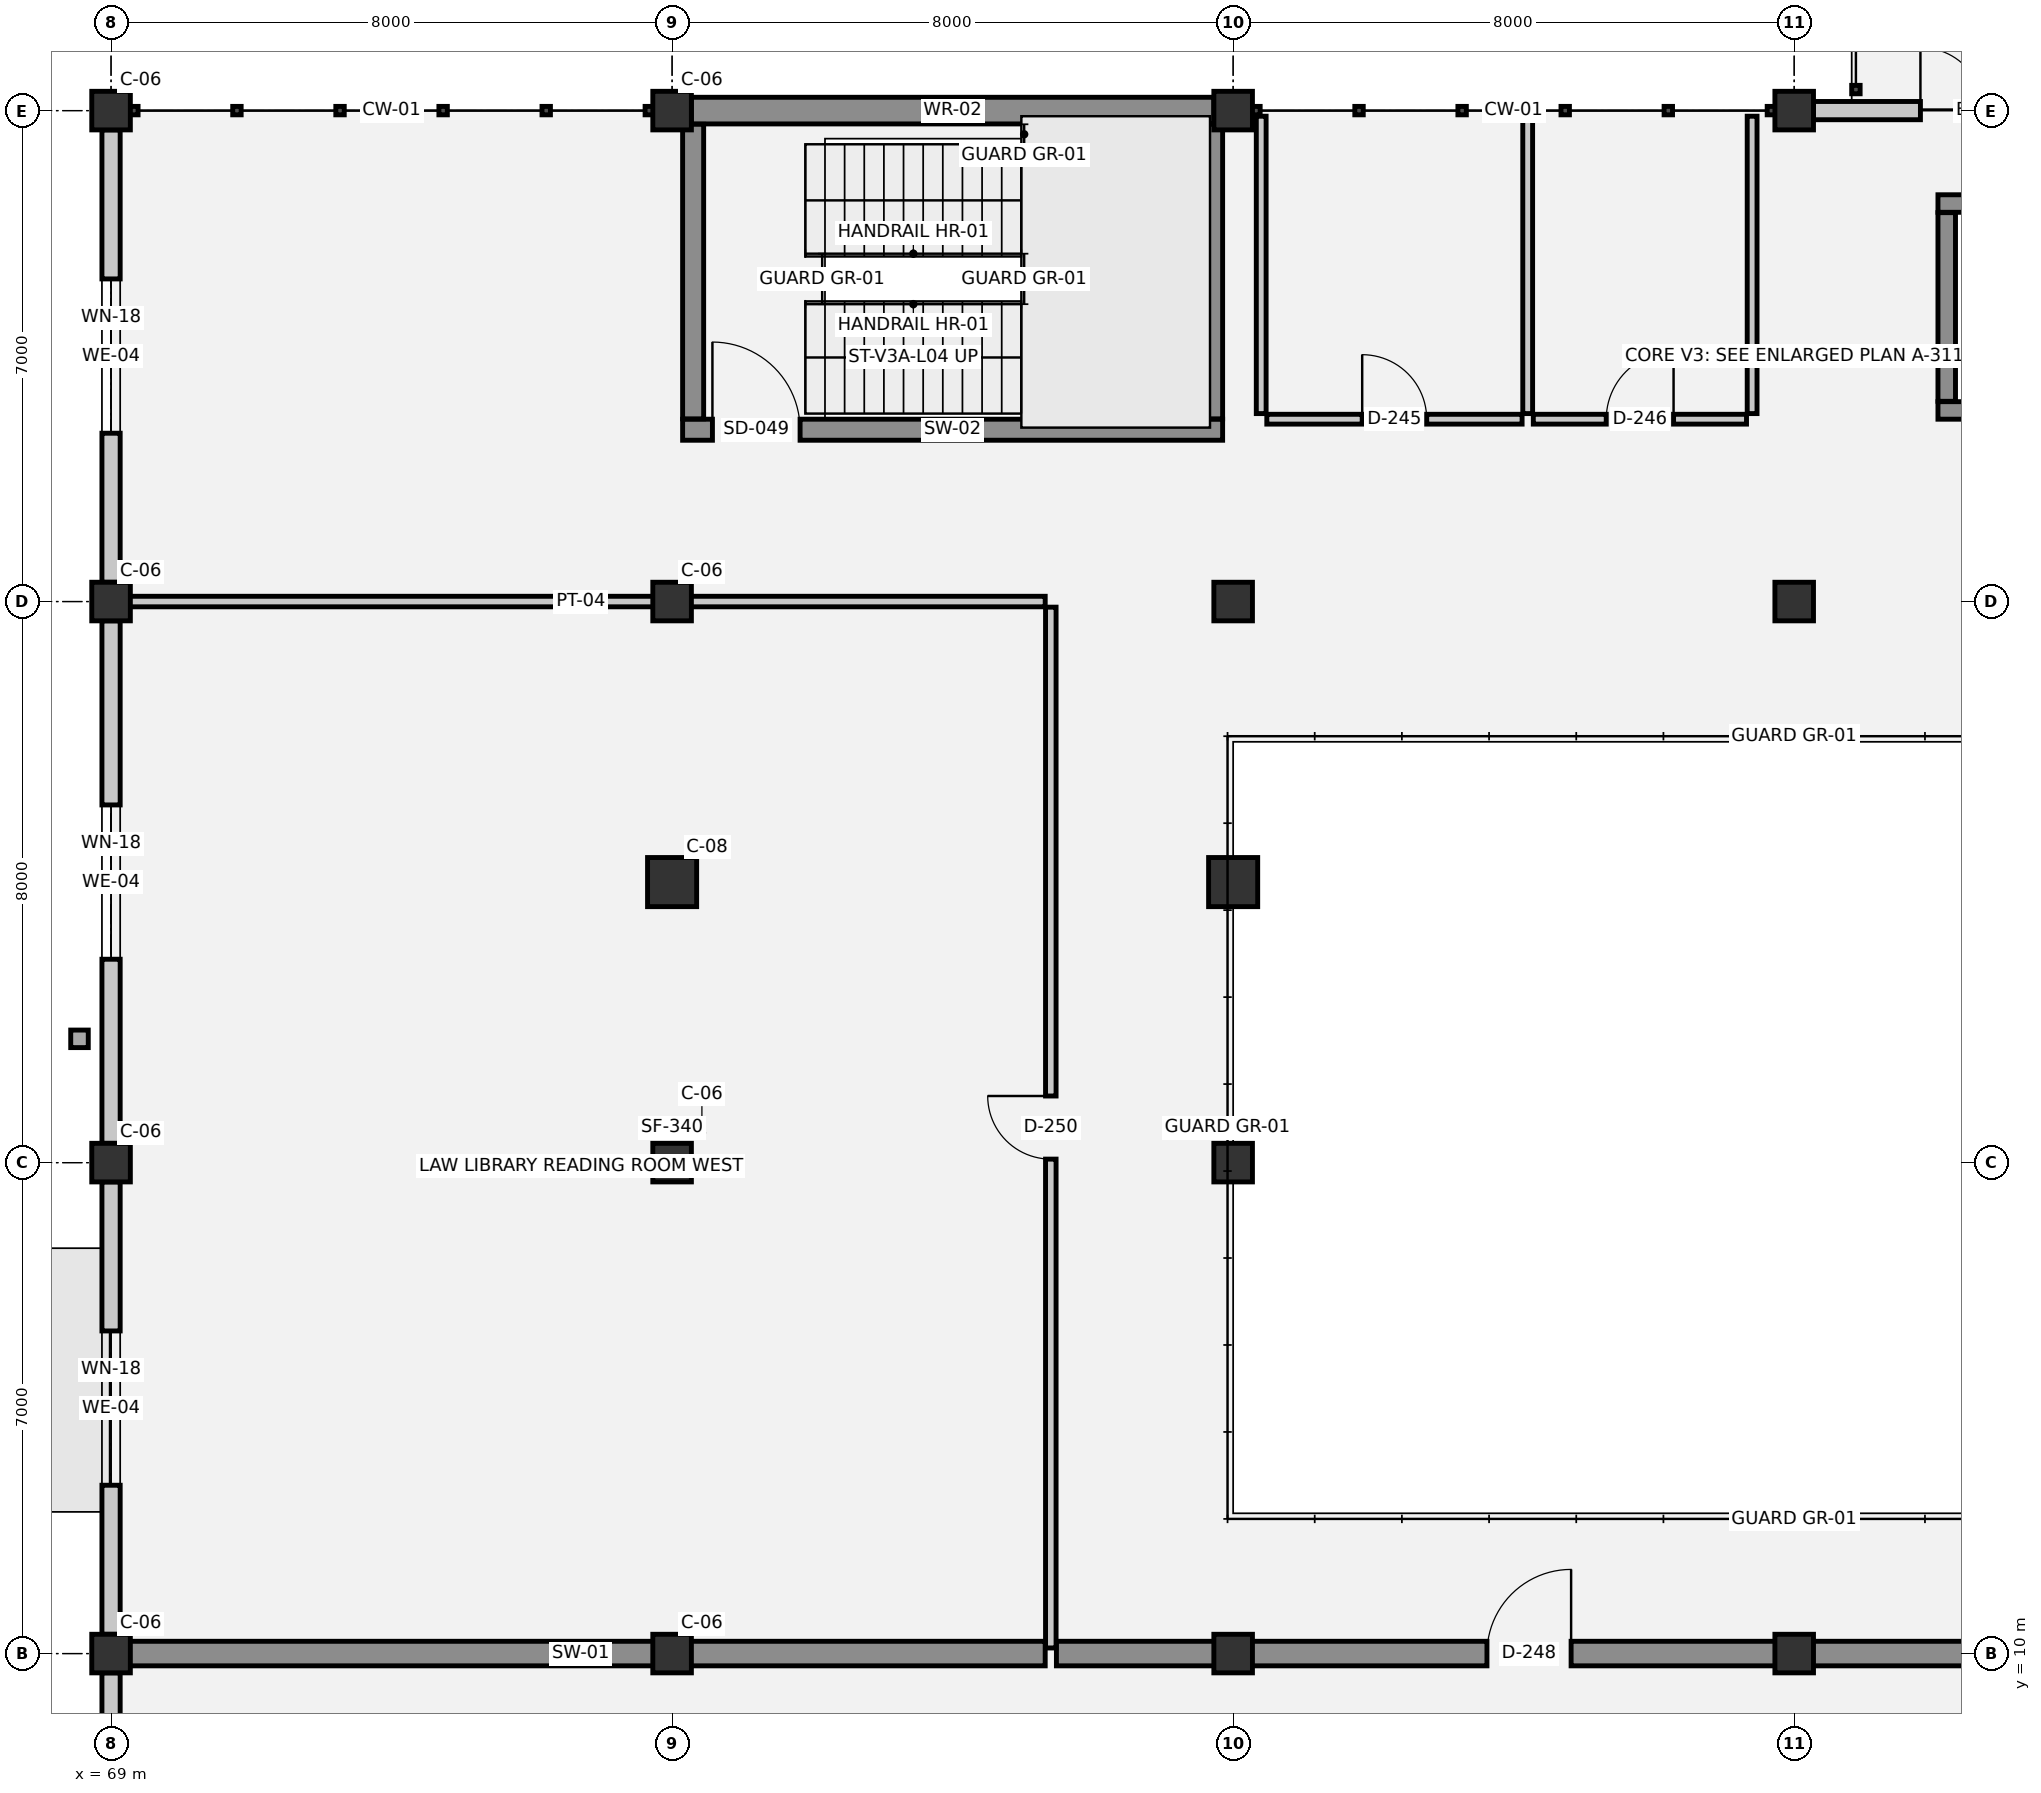
"""IFC4 building model, lengths in metres.
Left out: names, types, materials, properties, quantities, classifications, styles, units other than length and angle.
Written with IfcOpenShell. Run it as: python <this file> out.ifc"""

import sys

from ifc_helpers import new_model, si_unit, direction, frame, frame_2d, origin, origin_2d, place, context, subcontext, project, spatial, rectangle, circle, extrude, element, fill, save


model = new_model("IFC4")
c1 = context("Model", 3, precision=1e-05, world=origin(), true_north=direction((0.0, 1.0)))
c2 = subcontext(c1, "Body", "Model", "MODEL_VIEW")
j1 = project(units=[si_unit("LENGTHUNIT", "METRE"), si_unit("PLANEANGLEUNIT", "RADIAN")], contexts=[c1])
p1 = place(None, origin())
s1 = spatial("IfcSite", under=j1, at=p1, CompositionType="ELEMENT")
p2 = place(p1, origin())
s2 = spatial("IfcBuilding", under=s1, at=p2, CompositionType="ELEMENT")
p3 = place(p2, frame((0.0, 0.0, 14.4)))
s3 = spatial("IfcBuildingStorey", under=s2, at=p3, CompositionType="ELEMENT", Elevation=14.4)
for number, where, z_axis, x_axis in (
    (1, (69.0, 10.0, 0.0), (0.0, 0.0, 1.0), (1.0, 0.0, 0.0)),
    (2, (69.0, 17.0, 0.0), (0.0, 0.0, 1.0), (1.0, 0.0, 0.0)),
    (3, (69.0, 25.0, 0.0), (0.0, 0.0, 1.0), (1.0, 0.0, 0.0)),
    (4, (69.0, 32.0, 0.0), (0.0, 0.0, 1.0), (1.0, 0.0, 0.0)),
    (5, (77.0, 10.0, 0.0), (0.0, 0.0, 1.0), (1.0, 0.0, 0.0)),
    (6, (77.0, 17.0, 0.0), (0.0, 0.0, 1.0), (1.0, 0.0, 0.0)),
    (7, (77.0, 25.0, 0.0), (0.0, 0.0, 1.0), (1.0, 0.0, 0.0)),
    (8, (77.0, 32.0, 0.0), (0.0, 0.0, 1.0), (1.0, 0.0, 0.0)),
    (9, (85.0, 10.0, 0.0), (0.0, 0.0, 1.0), (1.0, 0.0, 0.0)),
    (10, (85.0, 17.0, 0.0), (0.0, 0.0, 1.0), (1.0, 0.0, 0.0)),
    (11, (85.0, 25.0, 0.0), (0.0, 0.0, 1.0), (1.0, 0.0, 0.0)),
    (12, (85.0, 32.0, 0.0), (0.0, 0.0, 1.0), (1.0, 0.0, 0.0)),
    (13, (93.0, 10.0, 0.0), (0.0, 0.0, 1.0), (1.0, 0.0, 0.0)),
    (14, (93.0, 25.0, 0.0), (0.0, 0.0, 1.0), (1.0, 0.0, 0.0)),
    (15, (93.0, 32.0, 0.0), (0.0, 0.0, 1.0), (1.0, 0.0, 0.0)),
):
    element("IfcColumn", number, at=place(p3, frame(where, z_axis=z_axis, x_axis=x_axis)), inside=s3, PredefinedType="COLUMN", context=c2, shape_type="SweptSolid", body=[
        extrude(rectangle(XDim=0.55, YDim=0.55, at=origin_2d()), origin(), (0.0, 0.0, 1.0), 3.9),
    ])
for number, where, z_axis, x_axis in (
    (16, (77.0, 21.0, 0.0), (0.0, 0.0, 1.0), (1.0, 0.0, 0.0)),
    (17, (85.0, 21.0, 0.0), (0.0, 0.0, 1.0), (1.0, 0.0, 0.0)),
):
    element("IfcColumn", number, at=place(p3, frame(where, z_axis=z_axis, x_axis=x_axis)), inside=s3, PredefinedType="COLUMN", context=c2, shape_type="SweptSolid", body=[
        extrude(circle(Radius=0.35, at=origin_2d()), origin(), (0.0, 0.0, 1.0), 3.9),
    ])
p4 = place(p3, frame((69.0, 4.275, 0.0), z_axis=(0.0, 0.0, 1.0), x_axis=(0.0, 1.0, 0.0)))
e18 = element("IfcWall", 18, at=p4, inside=s3, PredefinedType="SOLIDWALL", context=c2, shape_type="SweptSolid", body=[
    extrude(rectangle(XDim=5.45, YDim=0.26, at=frame_2d((2.725, 0.0))), origin(), (0.0, 0.0, 1.0), 2.84),
])
p5 = place(p4, frame((2.175, 0.0, 0.9)))
e19 = element("IfcOpeningElement", 19, at=p5, cuts=e18, PredefinedType="OPENING", context=c2, shape_type="SweptSolid", body=[
    extrude(rectangle(XDim=1.1, YDim=1.2, at=frame_2d((0.55, 0.6))), frame((0.0, 0.14, 0.0), z_axis=(0.0, -1.0, 0.0), x_axis=(1.0, 0.0, 0.0)), (0.0, 0.0, 1.0), 0.28),
])
p6 = place(p3, frame((69.0, 10.275, 0.0), z_axis=(0.0, 0.0, 1.0), x_axis=(0.0, 1.0, 0.0)))
e20 = element("IfcWall", 20, at=p6, inside=s3, PredefinedType="SOLIDWALL", context=c2, shape_type="SweptSolid", body=[
    extrude(rectangle(XDim=6.45, YDim=0.26, at=frame_2d((3.225, 0.0))), origin(), (0.0, 0.0, 1.0), 2.84),
])
p7 = place(p6, frame((2.125, 0.0, 0.9)))
e21 = element("IfcOpeningElement", 21, at=p7, cuts=e20, PredefinedType="OPENING", context=c2, shape_type="SweptSolid", body=[
    extrude(rectangle(XDim=2.2, YDim=1.0, at=frame_2d((1.1, 0.5))), frame((0.0, 0.14, 0.0), z_axis=(0.0, -1.0, 0.0), x_axis=(1.0, 0.0, 0.0)), (0.0, 0.0, 1.0), 0.28),
])
p8 = place(p3, frame((69.0, 17.275, 0.0), z_axis=(0.0, 0.0, 1.0), x_axis=(0.0, 1.0, 0.0)))
e22 = element("IfcWall", 22, at=p8, inside=s3, PredefinedType="SOLIDWALL", context=c2, shape_type="SweptSolid", body=[
    extrude(rectangle(XDim=7.45, YDim=0.26, at=frame_2d((3.725, 0.0))), origin(), (0.0, 0.0, 1.0), 2.84),
])
p9 = place(p8, frame((2.625, 0.0, 0.9)))
e23 = element("IfcOpeningElement", 23, at=p9, cuts=e22, PredefinedType="OPENING", context=c2, shape_type="SweptSolid", body=[
    extrude(rectangle(XDim=2.2, YDim=1.0, at=frame_2d((1.1, 0.5))), frame((0.0, 0.14, 0.0), z_axis=(0.0, -1.0, 0.0), x_axis=(1.0, 0.0, 0.0)), (0.0, 0.0, 1.0), 0.28),
])
p10 = place(p3, frame((69.0, 25.275, 0.0), z_axis=(0.0, 0.0, 1.0), x_axis=(0.0, 1.0, 0.0)))
e24 = element("IfcWall", 24, at=p10, inside=s3, PredefinedType="SOLIDWALL", context=c2, shape_type="SweptSolid", body=[
    extrude(rectangle(XDim=6.45, YDim=0.26, at=frame_2d((3.225, 0.0))), origin(), (0.0, 0.0, 1.0), 2.84),
])
p11 = place(p10, frame((2.125, 0.0, 0.9)))
e25 = element("IfcOpeningElement", 25, at=p11, cuts=e24, PredefinedType="OPENING", context=c2, shape_type="SweptSolid", body=[
    extrude(rectangle(XDim=2.2, YDim=1.0, at=frame_2d((1.1, 0.5))), frame((0.0, 0.14, 0.0), z_axis=(0.0, -1.0, 0.0), x_axis=(1.0, 0.0, 0.0)), (0.0, 0.0, 1.0), 0.28),
])
p12 = place(p3, frame((77.275, 32.0, 0.0), z_axis=(0.0, 0.0, 1.0), x_axis=(1.0, 0.0, 0.0)))
e26 = element("IfcWall", 26, at=p12, inside=s3, PredefinedType="STANDARD", context=c2, shape_type="SweptSolid", body=[
    extrude(rectangle(XDim=7.45, YDim=0.38, at=frame_2d((3.725, 0.0))), origin(), (0.0, 0.0, 1.0), 2.84),
])
p13 = place(p3, frame((93.275, 32.0, 0.0), z_axis=(0.0, 0.0, 1.0), x_axis=(1.0, 0.0, 0.0)))
e27 = element("IfcWall", 27, at=p13, inside=s3, PredefinedType="SOLIDWALL", context=c2, shape_type="SweptSolid", body=[
    extrude(rectangle(XDim=7.45, YDim=0.26, at=frame_2d((3.725, 0.0))), origin(), (0.0, 0.0, 1.0), 2.84),
])
p14 = place(p13, frame((1.525, 0.0, 0.0)))
e28 = element("IfcOpeningElement", 28, at=p14, cuts=e27, PredefinedType="OPENING", context=c2, shape_type="SweptSolid", body=[
    extrude(rectangle(XDim=1.8, YDim=2.25, at=frame_2d((0.9, 1.125))), frame((0.0, 0.14, 0.0), z_axis=(0.0, -1.0, 0.0), x_axis=(1.0, 0.0, 0.0)), (0.0, 0.0, 1.0), 0.28),
])
p15 = place(p3, frame((95.05, 27.725, 0.0), z_axis=(0.0, 0.0, 1.0), x_axis=(1.0, 0.0, 0.0)))
e29 = element("IfcWall", 29, at=p15, inside=s3, PredefinedType="SHEAR", context=c2, shape_type="SweptSolid", body=[
    extrude(rectangle(XDim=2.9, YDim=0.25, at=frame_2d((1.45, 0.0))), origin(), (0.0, 0.0, 1.0), 3.9),
])
p16 = place(p15, frame((0.9, 0.0, 0.0)))
e30 = element("IfcOpeningElement", 30, at=p16, cuts=e29, PredefinedType="OPENING", context=c2, shape_type="SweptSolid", body=[
    extrude(rectangle(XDim=1.1, YDim=2.15, at=frame_2d((0.55, 1.075))), frame((0.0, 0.135, 0.0), z_axis=(0.0, -1.0, 0.0), x_axis=(1.0, 0.0, 0.0)), (0.0, 0.0, 1.0), 0.27),
])
p17 = place(p3, frame((97.95, 30.675, 0.0), z_axis=(0.0, 0.0, 1.0), x_axis=(-1.0, 0.0, 0.0)))
e31 = element("IfcWall", 31, at=p17, inside=s3, PredefinedType="SHEAR", context=c2, shape_type="SweptSolid", body=[
    extrude(rectangle(XDim=2.9, YDim=0.25, at=frame_2d((1.45, 0.0))), origin(), (0.0, 0.0, 1.0), 3.9),
])
p18 = place(p3, frame((95.175, 30.545, 0.0), z_axis=(0.0, 0.0, 1.0), x_axis=(0.0, -1.0, 0.0)))
e32 = element("IfcWall", 32, at=p18, inside=s3, PredefinedType="SHEAR", context=c2, shape_type="SweptSolid", body=[
    extrude(rectangle(XDim=2.69, YDim=0.25, at=frame_2d((1.345, 0.0))), origin(), (0.0, 0.0, 1.0), 3.9),
])
p19 = place(p3, frame((77.15, 27.45, 0.0), z_axis=(0.0, 0.0, 1.0), x_axis=(1.0, 0.0, 0.0)))
e33 = element("IfcWall", 33, at=p19, inside=s3, PredefinedType="SHEAR", context=c2, shape_type="SweptSolid", body=[
    extrude(rectangle(XDim=7.7, YDim=0.3, at=frame_2d((3.85, 0.0))), origin(), (0.0, 0.0, 1.0), 3.56),
])
p20 = place(p19, frame((0.425, 0.0, 0.0)))
e34 = element("IfcOpeningElement", 34, at=p20, cuts=e33, PredefinedType="OPENING", context=c2, shape_type="SweptSolid", body=[
    extrude(rectangle(XDim=1.25, YDim=2.15, at=frame_2d((0.625, 1.075))), frame((0.0, 0.16, 0.0), z_axis=(0.0, -1.0, 0.0), x_axis=(1.0, 0.0, 0.0)), (0.0, 0.0, 1.0), 0.32),
])
for number, where, z_axis, x_axis in (
    (35, (77.3, 31.805, 0.0), (0.0, 0.0, 1.0), (0.0, -1.0, 0.0)),
    (36, (84.7, 27.605, 0.0), (0.0, 0.0, 1.0), (0.0, 1.0, 0.0)),
):
    element("IfcWall", number, at=place(p3, frame(where, z_axis=z_axis, x_axis=x_axis)), inside=s3, PredefinedType="SHEAR", context=c2, shape_type="SweptSolid", body=[
        extrude(rectangle(XDim=4.2, YDim=0.3, at=frame_2d((2.1, 0.0))), origin(), (0.0, 0.0, 1.0), 3.56),
    ])
p21 = place(p3, frame((69.08, 10.0, 0.0), z_axis=(0.0, 0.0, 1.0), x_axis=(1.0, 0.0, 0.0)))
e37 = element("IfcWall", 37, at=p21, inside=s3, PredefinedType="SHEAR", context=c2, shape_type="SweptSolid", body=[
    extrude(rectangle(XDim=13.24, YDim=0.35, at=frame_2d((6.62, 0.0))), origin(), (0.0, 0.0, 1.0), 3.54),
])
p22 = place(p3, frame((82.48, 10.0, 0.0), z_axis=(0.0, 0.0, 1.0), x_axis=(1.0, 0.0, 0.0)))
e38 = element("IfcWall", 38, at=p22, inside=s3, PredefinedType="SHEAR", context=c2, shape_type="SweptSolid", body=[
    extrude(rectangle(XDim=18.44, YDim=0.35, at=frame_2d((9.22, 0.0))), origin(), (0.0, 0.0, 1.0), 3.54),
])
p23 = place(p22, frame((6.139, 0.0, 0.0)))
e39 = element("IfcOpeningElement", 39, at=p23, cuts=e38, PredefinedType="OPENING", context=c2, shape_type="SweptSolid", body=[
    extrude(rectangle(XDim=1.2, YDim=2.15, at=frame_2d((0.6, 1.075))), frame((0.0, 0.185, 0.0), z_axis=(0.0, -1.0, 0.0), x_axis=(1.0, 0.0, 0.0)), (0.0, 0.0, 1.0), 0.37),
])
p24 = place(p3, frame((69.08, 25.0, 0.0), z_axis=(0.0, 0.0, 1.0), x_axis=(1.0, 0.0, 0.0)))
e40 = element("IfcWall", 40, at=p24, inside=s3, PredefinedType="PARTITIONING", context=c2, shape_type="SweptSolid", body=[
    extrude(rectangle(XDim=13.24, YDim=0.15, at=frame_2d((6.62, 0.0))), origin(), (0.0, 0.0, 1.0), 2.96),
])
p25 = place(p3, frame((85.48, 27.6, 0.0), z_axis=(0.0, 0.0, 1.0), x_axis=(1.0, 0.0, 0.0)))
e41 = element("IfcWall", 41, at=p25, inside=s3, PredefinedType="PLUMBINGWALL", context=c2, shape_type="SweptSolid", body=[
    extrude(rectangle(XDim=3.64, YDim=0.14, at=frame_2d((1.82, 0.0))), origin(), (0.0, 0.0, 1.0), 3.54),
])
p26 = place(p25, frame((1.36, 0.0, 0.0)))
e42 = element("IfcOpeningElement", 42, at=p26, cuts=e41, PredefinedType="OPENING", context=c2, shape_type="SweptSolid", body=[
    extrude(rectangle(XDim=0.92, YDim=2.1, at=frame_2d((0.46, 1.05))), frame((0.0, 0.08, 0.0), z_axis=(0.0, -1.0, 0.0), x_axis=(1.0, 0.0, 0.0)), (0.0, 0.0, 1.0), 0.16),
])
p27 = place(p3, frame((89.28, 27.6, 0.0), z_axis=(0.0, 0.0, 1.0), x_axis=(1.0, 0.0, 0.0)))
e43 = element("IfcWall", 43, at=p27, inside=s3, PredefinedType="PLUMBINGWALL", context=c2, shape_type="SweptSolid", body=[
    extrude(rectangle(XDim=3.04, YDim=0.14, at=frame_2d((1.52, 0.0))), origin(), (0.0, 0.0, 1.0), 3.54),
])
p28 = place(p27, frame((1.04, 0.0, 0.0)))
e44 = element("IfcOpeningElement", 44, at=p28, cuts=e43, PredefinedType="OPENING", context=c2, shape_type="SweptSolid", body=[
    extrude(rectangle(XDim=0.96, YDim=2.1, at=frame_2d((0.48, 1.05))), frame((0.0, 0.08, 0.0), z_axis=(0.0, -1.0, 0.0), x_axis=(1.0, 0.0, 0.0)), (0.0, 0.0, 1.0), 0.16),
])
p29 = place(p3, frame((82.4, 10.08, 0.0), z_axis=(0.0, 0.0, 1.0), x_axis=(0.0, 1.0, 0.0)))
e45 = element("IfcWall", 45, at=p29, inside=s3, PredefinedType="PARTITIONING", context=c2, shape_type="SweptSolid", body=[
    extrude(rectangle(XDim=14.84, YDim=0.15, at=frame_2d((7.42, 0.0))), origin(), (0.0, 0.0, 1.0), 3.54),
])
p30 = place(p29, frame((6.97, 0.0, 0.0)))
e46 = element("IfcOpeningElement", 46, at=p30, cuts=e45, PredefinedType="OPENING", context=c2, shape_type="SweptSolid", body=[
    extrude(rectangle(XDim=0.9, YDim=2.15, at=frame_2d((0.45, 1.075))), frame((0.0, 0.085, 0.0), z_axis=(0.0, -1.0, 0.0), x_axis=(1.0, 0.0, 0.0)), (0.0, 0.0, 1.0), 0.17),
])
for number, where, z_axis, x_axis in (
    (47, (85.4, 27.68, 0.0), (0.0, 0.0, 1.0), (0.0, 1.0, 0.0)),
    (48, (89.2, 27.68, 0.0), (0.0, 0.0, 1.0), (0.0, 1.0, 0.0)),
    (49, (92.4, 27.68, 0.0), (0.0, 0.0, 1.0), (0.0, 1.0, 0.0)),
):
    element("IfcWall", number, at=place(p3, frame(where, z_axis=z_axis, x_axis=x_axis)), inside=s3, PredefinedType="PLUMBINGWALL", context=c2, shape_type="SweptSolid", body=[
        extrude(rectangle(XDim=4.24, YDim=0.14, at=frame_2d((2.12, 0.0))), origin(), (0.0, 0.0, 1.0), 3.54),
    ])
p31 = place(p7, origin())
e50 = element("IfcWindow", 50, at=p31, inside=s3, PartitioningType="SINGLE_PANEL", PredefinedType="WINDOW", context=c2, shape_type="SweptSolid", body=[
    extrude(rectangle(XDim=2.2, YDim=1.0, at=frame_2d((1.1, 0.5))), frame((0.0, 0.03, 0.0), z_axis=(0.0, -1.0, 0.0), x_axis=(1.0, 0.0, 0.0)), (0.0, 0.0, 1.0), 0.06),
])
fill(e21, e50)
p32 = place(p9, origin())
e51 = element("IfcWindow", 51, at=p32, inside=s3, PartitioningType="SINGLE_PANEL", PredefinedType="WINDOW", context=c2, shape_type="SweptSolid", body=[
    extrude(rectangle(XDim=2.2, YDim=1.0, at=frame_2d((1.1, 0.5))), frame((0.0, 0.03, 0.0), z_axis=(0.0, -1.0, 0.0), x_axis=(1.0, 0.0, 0.0)), (0.0, 0.0, 1.0), 0.06),
])
fill(e23, e51)
p33 = place(p11, origin())
e52 = element("IfcWindow", 52, at=p33, inside=s3, PartitioningType="SINGLE_PANEL", PredefinedType="WINDOW", context=c2, shape_type="SweptSolid", body=[
    extrude(rectangle(XDim=2.2, YDim=1.0, at=frame_2d((1.1, 0.5))), frame((0.0, 0.03, 0.0), z_axis=(0.0, -1.0, 0.0), x_axis=(1.0, 0.0, 0.0)), (0.0, 0.0, 1.0), 0.06),
])
fill(e25, e52)
p34 = place(p14, origin())
e53 = element("IfcDoor", 53, at=p34, inside=s3, OperationType="DOUBLE_DOOR_SINGLE_SWING", PredefinedType="DOOR", context=c2, shape_type="SweptSolid", body=[
    extrude(rectangle(XDim=1.8, YDim=2.25, at=frame_2d((0.9, 1.125))), frame((0.0, 0.025, 0.0), z_axis=(0.0, -1.0, 0.0), x_axis=(1.0, 0.0, 0.0)), (0.0, 0.0, 1.0), 0.05),
])
fill(e28, e53)
p35 = place(p20, origin())
e54 = element("IfcDoor", 54, at=p35, inside=s3, OperationType="SINGLE_SWING_LEFT", PredefinedType="DOOR", context=c2, shape_type="SweptSolid", body=[
    extrude(rectangle(XDim=1.25, YDim=2.15, at=frame_2d((0.625, 1.075))), frame((0.0, 0.025, 0.0), z_axis=(0.0, -1.0, 0.0), x_axis=(1.0, 0.0, 0.0)), (0.0, 0.0, 1.0), 0.05),
])
fill(e34, e54)
p36 = place(p26, origin())
e55 = element("IfcDoor", 55, at=p36, inside=s3, OperationType="SINGLE_SWING_LEFT", PredefinedType="DOOR", context=c2, shape_type="SweptSolid", body=[
    extrude(rectangle(XDim=0.92, YDim=2.1, at=frame_2d((0.46, 1.05))), frame((0.0, 0.025, 0.0), z_axis=(0.0, -1.0, 0.0), x_axis=(1.0, 0.0, 0.0)), (0.0, 0.0, 1.0), 0.05),
])
fill(e42, e55)
p37 = place(p28, origin())
e56 = element("IfcDoor", 56, at=p37, inside=s3, OperationType="SINGLE_SWING_RIGHT", PredefinedType="DOOR", context=c2, shape_type="SweptSolid", body=[
    extrude(rectangle(XDim=0.96, YDim=2.1, at=frame_2d((0.48, 1.05))), frame((0.0, 0.025, 0.0), z_axis=(0.0, -1.0, 0.0), x_axis=(1.0, 0.0, 0.0)), (0.0, 0.0, 1.0), 0.05),
])
fill(e44, e56)
p38 = place(p23, origin())
e57 = element("IfcDoor", 57, at=p38, inside=s3, OperationType="SINGLE_SWING_RIGHT", PredefinedType="DOOR", context=c2, shape_type="SweptSolid", body=[
    extrude(rectangle(XDim=1.2, YDim=2.15, at=frame_2d((0.6, 1.075))), frame((0.0, 0.025, 0.0), z_axis=(0.0, -1.0, 0.0), x_axis=(1.0, 0.0, 0.0)), (0.0, 0.0, 1.0), 0.05),
])
fill(e39, e57)
p39 = place(p30, origin())
e58 = element("IfcDoor", 58, at=p39, inside=s3, OperationType="SINGLE_SWING_RIGHT", PredefinedType="DOOR", context=c2, shape_type="SweptSolid", body=[
    extrude(rectangle(XDim=0.9, YDim=2.15, at=frame_2d((0.45, 1.075))), frame((0.0, 0.025, 0.0), z_axis=(0.0, -1.0, 0.0), x_axis=(1.0, 0.0, 0.0)), (0.0, 0.0, 1.0), 0.05),
])
fill(e46, e58)
save(model, sys.argv[1])
